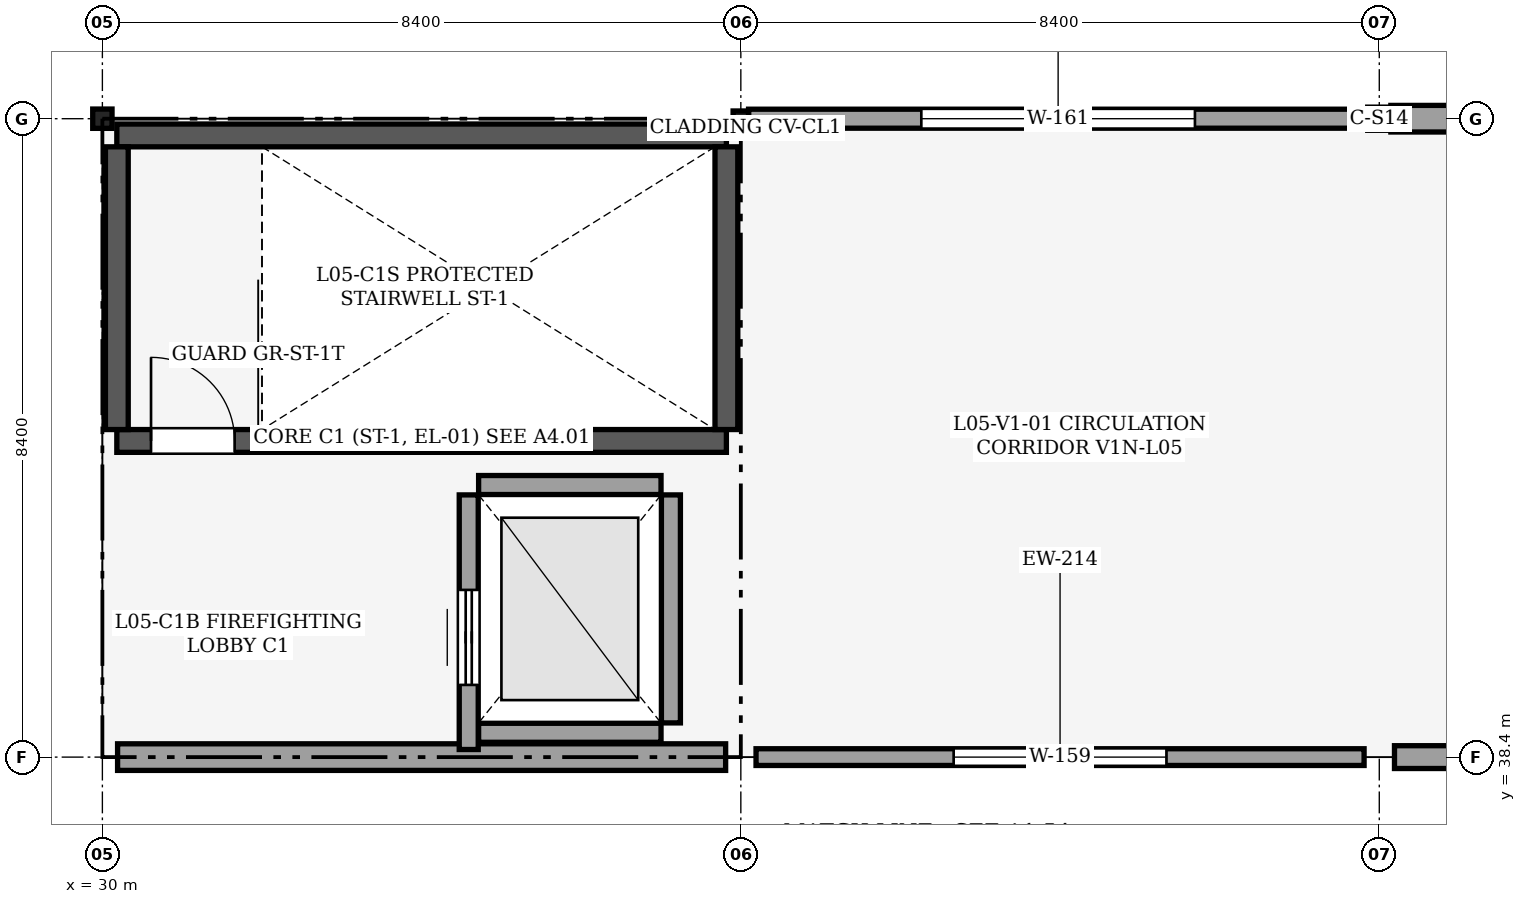
"""IFC4 building model, lengths in metres.
Left out: names, types, materials, properties, quantities, classifications, styles, units other than length and angle.
Written with IfcOpenShell. Run it as: python <this file> out.ifc"""

import sys

from ifc_helpers import new_model, si_unit, direction, frame, frame_2d, origin, origin_2d, place, context, subcontext, project, spatial, rectangle, hollow_rectangle, extrude, element, fill, save


model = new_model("IFC4")
c1 = context("Model", 3, precision=1e-05, world=origin(), true_north=direction((0.0, 1.0)))
c2 = subcontext(c1, "Body", "Model", "MODEL_VIEW")
j1 = project(units=[si_unit("LENGTHUNIT", "METRE"), si_unit("PLANEANGLEUNIT", "RADIAN")], contexts=[c1])
p1 = place(None, origin())
s1 = spatial("IfcSite", under=j1, at=p1, CompositionType="ELEMENT")
p2 = place(p1, origin())
s2 = spatial("IfcBuilding", under=s1, at=p2, CompositionType="ELEMENT")
p3 = place(p2, frame((0.0, 0.0, 24.6)))
s3 = spatial("IfcBuildingStorey", under=s2, at=p3, CompositionType="ELEMENT", Elevation=24.6)
p4 = place(p3, frame((30.0, 46.8, 0.0), z_axis=(0.0, 0.0, 1.0), x_axis=(1.0, 0.0, 0.0)))
e1 = element("IfcColumn", 1, at=p4, inside=s3, PredefinedType="COLUMN", context=c2, shape_type="SweptSolid", body=[
    extrude(hollow_rectangle(XDim=0.254, YDim=0.254, WallThickness=0.013, OuterFilletRadius=0.025, at=origin_2d()), origin(), (0.0, 0.0, 1.0), 4.8),
])
p5 = place(p3, frame((38.4, 46.8, 0.0), z_axis=(0.0, 0.0, 1.0), x_axis=(1.0, 0.0, 0.0)))
e2 = element("IfcColumn", 2, at=p5, inside=s3, PredefinedType="COLUMN", context=c2, shape_type="SweptSolid", body=[
    extrude(hollow_rectangle(XDim=0.203, YDim=0.203, WallThickness=0.013, OuterFilletRadius=0.025, at=origin_2d()), origin(), (0.0, 0.0, 1.0), 4.8),
])
p6 = place(p3, frame((46.8, 46.8, 0.0), z_axis=(0.0, 0.0, 1.0), x_axis=(1.0, 0.0, 0.0)))
e3 = element("IfcColumn", 3, at=p6, inside=s3, PredefinedType="COLUMN", context=c2, shape_type="SweptSolid", body=[
    extrude(hollow_rectangle(XDim=0.305, YDim=0.305, WallThickness=0.016, OuterFilletRadius=0.032, at=origin_2d()), origin(), (0.0, 0.0, 1.0), 4.8),
])
p7 = place(p3, frame((38.2, 38.4, 0.0), z_axis=(0.0, 0.0, 1.0), x_axis=(-1.0, 0.0, 0.0)))
e4 = element("IfcWall", 4, at=p7, inside=s3, PredefinedType="SOLIDWALL", context=c2, shape_type="SweptSolid", body=[
    extrude(rectangle(XDim=8.0, YDim=0.35, at=frame_2d((4.0, 0.0))), origin(), (0.0, 0.0, 1.0), 4.6),
])
p8 = place(p3, frame((46.6, 38.4, 0.0), z_axis=(0.0, 0.0, 1.0), x_axis=(-1.0, 0.0, 0.0)))
e5 = element("IfcWall", 5, at=p8, inside=s3, PredefinedType="SOLIDWALL", context=c2, shape_type="SweptSolid", body=[
    extrude(rectangle(XDim=8.0, YDim=0.22, at=frame_2d((4.0, 0.0))), origin(), (0.0, 0.0, 1.0), 4.6),
])
p9 = place(p8, frame((2.6, 0.0, 0.9)))
e6 = element("IfcOpeningElement", 6, at=p9, cuts=e5, PredefinedType="OPENING", context=c2, shape_type="SweptSolid", body=[
    extrude(rectangle(XDim=2.8, YDim=0.9, at=frame_2d((1.4, 0.45))), frame((0.0, 0.12, 0.0), z_axis=(0.0, -1.0, 0.0), x_axis=(1.0, 0.0, 0.0)), (0.0, 0.0, 1.0), 0.24),
])
p10 = place(p3, frame((55.0, 38.4, 0.0), z_axis=(0.0, 0.0, 1.0), x_axis=(-1.0, 0.0, 0.0)))
e7 = element("IfcWall", 7, at=p10, inside=s3, PredefinedType="SOLIDWALL", context=c2, shape_type="SweptSolid", body=[
    extrude(rectangle(XDim=8.0, YDim=0.3, at=frame_2d((4.0, 0.0))), origin(), (0.0, 0.0, 1.0), 4.6),
])
p11 = place(p10, frame((2.4, 0.0, 0.9)))
e8 = element("IfcOpeningElement", 8, at=p11, cuts=e7, PredefinedType="OPENING", context=c2, shape_type="SweptSolid", body=[
    extrude(rectangle(XDim=3.2, YDim=1.05, at=frame_2d((1.6, 0.525))), frame((0.0, 0.16, 0.0), z_axis=(0.0, -1.0, 0.0), x_axis=(1.0, 0.0, 0.0)), (0.0, 0.0, 1.0), 0.321),
])
p12 = place(p3, frame((38.502, 46.8, 0.0), z_axis=(0.0, 0.0, 1.0), x_axis=(1.0, 0.0, 0.0)))
e9 = element("IfcWall", 9, at=p12, inside=s3, PredefinedType="SOLIDWALL", context=c2, shape_type="SweptSolid", body=[
    extrude(rectangle(XDim=8.146, YDim=0.25, at=frame_2d((4.073, 0.0))), origin(), (0.0, 0.0, 1.0), 3.842),
])
p13 = place(p12, frame((2.273, 0.0, 0.9)))
e10 = element("IfcOpeningElement", 10, at=p13, cuts=e9, PredefinedType="OPENING", context=c2, shape_type="SweptSolid", body=[
    extrude(rectangle(XDim=3.6, YDim=1.05, at=frame_2d((1.8, 0.525))), frame((0.0, 0.135, 0.0), z_axis=(0.0, -1.0, 0.0), x_axis=(1.0, 0.0, 0.0)), (0.0, 0.0, 1.0), 0.271),
])
p14 = place(p3, frame((46.952, 46.8, 0.0), z_axis=(0.0, 0.0, 1.0), x_axis=(1.0, 0.0, 0.0)))
e11 = element("IfcWall", 11, at=p14, inside=s3, PredefinedType="SOLIDWALL", context=c2, shape_type="SweptSolid", body=[
    extrude(rectangle(XDim=8.146, YDim=0.35, at=frame_2d((4.073, 0.0))), origin(), (0.0, 0.0, 1.0), 3.842),
])
p15 = place(p14, frame((2.773, 0.0, 0.85)))
e12 = element("IfcOpeningElement", 12, at=p15, cuts=e11, PredefinedType="OPENING", context=c2, shape_type="SweptSolid", body=[
    extrude(rectangle(XDim=2.6, YDim=1.9, at=frame_2d((1.3, 0.95))), frame((0.0, 0.185, 0.0), z_axis=(0.0, -1.0, 0.0), x_axis=(1.0, 0.0, 0.0)), (0.0, 0.0, 1.0), 0.371),
])
p16 = place(p3, frame((30.19, 42.56, 0.0), z_axis=(0.0, 0.0, 1.0), x_axis=(1.0, 0.0, 0.0)))
e13 = element("IfcWall", 13, at=p16, inside=s3, PredefinedType="SHEAR", context=c2, shape_type="SweptSolid", body=[
    extrude(rectangle(XDim=8.02, YDim=0.3, at=frame_2d((4.01, 0.0))), origin(), (0.0, 0.0, 1.0), 4.6),
])
p17 = place(p16, frame((0.45, 0.0, 0.0)))
e14 = element("IfcOpeningElement", 14, at=p17, cuts=e13, PredefinedType="OPENING", context=c2, shape_type="SweptSolid", body=[
    extrude(rectangle(XDim=1.1, YDim=2.15, at=frame_2d((0.55, 1.075))), frame((0.0, 0.16, 0.0), z_axis=(0.0, -1.0, 0.0), x_axis=(1.0, 0.0, 0.0)), (0.0, 0.0, 1.0), 0.321),
])
p18 = place(p3, frame((30.19, 46.58, 0.0), z_axis=(0.0, 0.0, 1.0), x_axis=(1.0, 0.0, 0.0)))
e15 = element("IfcWall", 15, at=p18, inside=s3, PredefinedType="SHEAR", context=c2, shape_type="SweptSolid", body=[
    extrude(rectangle(XDim=8.02, YDim=0.3, at=frame_2d((4.01, 0.0))), origin(), (0.0, 0.0, 1.0), 4.6),
])
for number, where, z_axis, x_axis in (
    (16, (30.19, 42.71, 0.0), (0.0, 0.0, 1.0), (0.0, 1.0, 0.0)),
    (17, (38.21, 42.71, 0.0), (0.0, 0.0, 1.0), (0.0, 1.0, 0.0)),
):
    element("IfcWall", number, at=place(p3, frame(where, z_axis=z_axis, x_axis=x_axis)), inside=s3, PredefinedType="SHEAR", context=c2, shape_type="SweptSolid", body=[
        extrude(rectangle(XDim=3.72, YDim=0.3, at=frame_2d((1.86, 0.0))), origin(), (0.0, 0.0, 1.0), 4.6),
    ])
p19 = place(p3, frame((37.48, 38.85, 0.0), z_axis=(0.0, 0.0, 1.0), x_axis=(0.0, 1.0, 0.0)))
e18 = element("IfcWall", 18, at=p19, inside=s3, PredefinedType="PARTITIONING", context=c2, shape_type="SweptSolid", body=[
    extrude(rectangle(XDim=3.0, YDim=0.25, at=frame_2d((1.5, 0.0))), origin(), (0.0, 0.0, 1.0), 4.6),
])
for number, where, z_axis, x_axis in (
    (19, (34.95, 38.72, 0.0), (0.0, 0.0, 1.0), (1.0, 0.0, 0.0)),
    (20, (34.95, 41.98, 0.0), (0.0, 0.0, 1.0), (1.0, 0.0, 0.0)),
):
    element("IfcWall", number, at=place(p3, frame(where, z_axis=z_axis, x_axis=x_axis)), inside=s3, PredefinedType="PARTITIONING", context=c2, shape_type="SweptSolid", body=[
        extrude(rectangle(XDim=2.4, YDim=0.25, at=frame_2d((1.2, 0.0))), origin(), (0.0, 0.0, 1.0), 4.6),
    ])
p20 = place(p3, frame((34.82, 38.5, 0.0), z_axis=(0.0, 0.0, 1.0), x_axis=(0.0, 1.0, 0.0)))
e21 = element("IfcWall", 21, at=p20, inside=s3, PredefinedType="PARTITIONING", context=c2, shape_type="SweptSolid", body=[
    extrude(rectangle(XDim=3.35, YDim=0.25, at=frame_2d((1.675, 0.0))), origin(), (0.0, 0.0, 1.0), 4.6),
])
p21 = place(p20, frame((0.85, 0.0, 0.0)))
e22 = element("IfcOpeningElement", 22, at=p21, cuts=e21, PredefinedType="OPENING", context=c2, shape_type="SweptSolid", body=[
    extrude(rectangle(XDim=1.25, YDim=2.15, at=frame_2d((0.625, 1.075))), frame((0.0, 0.135, 0.0), z_axis=(0.0, -1.0, 0.0), x_axis=(1.0, 0.0, 0.0)), (0.0, 0.0, 1.0), 0.271),
])
p22 = place(p9, origin())
e23 = element("IfcWindow", 23, at=p22, inside=s3, PartitioningType="SINGLE_PANEL", PredefinedType="WINDOW", context=c2, shape_type="SweptSolid", body=[
    extrude(rectangle(XDim=2.8, YDim=0.9, at=frame_2d((1.4, 0.45))), frame((0.0, 0.03, 0.0), z_axis=(0.0, -1.0, 0.0), x_axis=(1.0, 0.0, 0.0)), (0.0, 0.0, 1.0), 0.06),
])
fill(e6, e23)
p23 = place(p13, origin())
e24 = element("IfcWindow", 24, at=p23, inside=s3, PartitioningType="SINGLE_PANEL", PredefinedType="WINDOW", context=c2, shape_type="SweptSolid", body=[
    extrude(rectangle(XDim=3.6, YDim=1.05, at=frame_2d((1.8, 0.525))), frame((0.0, 0.03, 0.0), z_axis=(0.0, -1.0, 0.0), x_axis=(1.0, 0.0, 0.0)), (0.0, 0.0, 1.0), 0.06),
])
fill(e10, e24)
p24 = place(p17, origin())
e25 = element("IfcDoor", 25, at=p24, inside=s3, OperationType="SINGLE_SWING_LEFT", PredefinedType="DOOR", context=c2, shape_type="SweptSolid", body=[
    extrude(rectangle(XDim=1.1, YDim=2.15, at=frame_2d((0.55, 1.075))), frame((0.0, 0.025, 0.0), z_axis=(0.0, -1.0, 0.0), x_axis=(1.0, 0.0, 0.0)), (0.0, 0.0, 1.0), 0.05),
])
fill(e14, e25)
p25 = place(p21, origin())
e26 = element("IfcDoor", 26, at=p25, inside=s3, OperationType="DOUBLE_DOOR_SLIDING", PredefinedType="DOOR", context=c2, shape_type="SweptSolid", body=[
    extrude(rectangle(XDim=1.25, YDim=2.15, at=frame_2d((0.625, 1.075))), frame((0.0, 0.025, 0.0), z_axis=(0.0, -1.0, 0.0), x_axis=(1.0, 0.0, 0.0)), (0.0, 0.0, 1.0), 0.05),
])
fill(e22, e26)
save(model, sys.argv[1])
